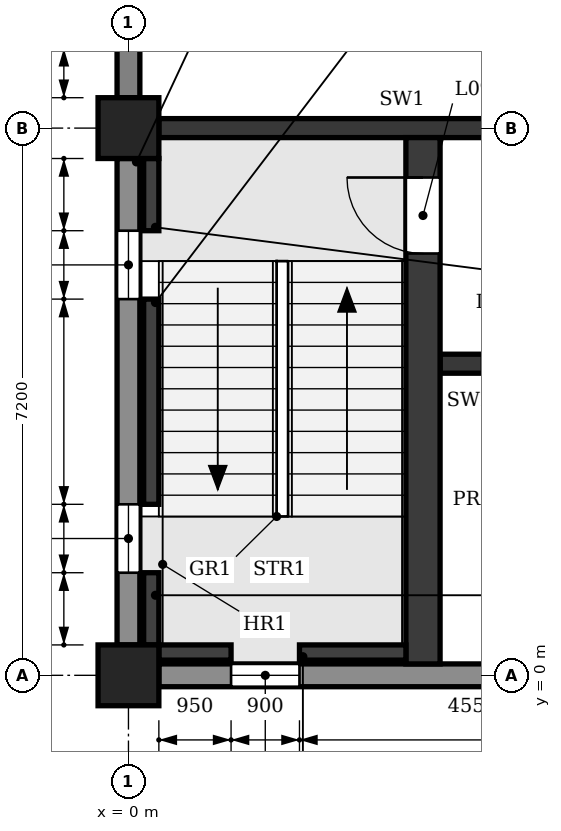
"""IFC4 building model, lengths in metres.
Left out: names, types, materials, properties, quantities, classifications, styles, units other than length and angle.
Written with IfcOpenShell. Run it as: python <this file> out.ifc"""

import sys

from ifc_helpers import new_model, si_unit, direction, frame, frame_2d, origin, origin_2d, place, context, subcontext, project, spatial, polyline, rectangle, outline, extrude, element, fill, save


model = new_model("IFC4")
c1 = context("Model", 3, precision=1e-05, world=origin(), true_north=direction((0.0, 1.0)))
c2 = subcontext(c1, "Body", "Model", "MODEL_VIEW")
j1 = project(units=[si_unit("LENGTHUNIT", "METRE"), si_unit("PLANEANGLEUNIT", "RADIAN")], contexts=[c1])
p1 = place(None, origin())
s1 = spatial("IfcSite", under=j1, at=p1, CompositionType="ELEMENT")
p2 = place(p1, origin())
s2 = spatial("IfcBuilding", under=s1, at=p2, CompositionType="ELEMENT")
p3 = place(p2, frame((0.0, 0.0, 45.3)))
s3 = spatial("IfcBuildingStorey", under=s2, at=p3, CompositionType="ELEMENT", Elevation=45.3)
for number, where, z_axis, x_axis in (
    (1, (0.0, 0.0, 0.0), (0.0, 0.0, 1.0), (1.0, 0.0, 0.0)),
    (2, (0.0, 7.2, 0.0), (0.0, 0.0, 1.0), (1.0, 0.0, 0.0)),
):
    element("IfcColumn", number, at=place(p3, frame(where, z_axis=z_axis, x_axis=x_axis)), inside=s3, PredefinedType="COLUMN", context=c2, shape_type="SweptSolid", body=[
        extrude(rectangle(XDim=0.8, YDim=0.8, at=origin_2d()), origin(), (0.0, 0.0, 1.0), 4.5),
    ])
p4 = place(p3, frame((0.0, 0.4, 0.0), z_axis=(0.0, 0.0, 1.0), x_axis=(0.0, 1.0, 0.0)))
e3 = element("IfcWall", 3, at=p4, inside=s3, PredefinedType="STANDARD", context=c2, shape_type="SweptSolid", body=[
    extrude(rectangle(XDim=6.4, YDim=0.3, at=frame_2d((3.2, 0.0))), origin(), (0.0, 0.0, 1.0), 3.65),
])
p5 = place(p4, frame((0.95, 0.0, 0.9)))
e4 = element("IfcOpeningElement", 4, at=p5, cuts=e3, PredefinedType="OPENING", context=c2, shape_type="SweptSolid", body=[
    extrude(outline(polyline([(0.0, 0.0), (0.9, 0.0), (0.9, 2.25), (0.45, 2.7), (0.0, 2.25), (0.0, 0.0)])), frame((0.0, 0.16, 0.0), z_axis=(0.0, -1.0, 0.0), x_axis=(1.0, 0.0, 0.0)), (0.0, 0.0, 1.0), 0.32),
])
p6 = place(p4, frame((4.55, 0.0, 0.9)))
e5 = element("IfcOpeningElement", 5, at=p6, cuts=e3, PredefinedType="OPENING", context=c2, shape_type="SweptSolid", body=[
    extrude(outline(polyline([(0.0, 0.0), (0.9, 0.0), (0.9, 2.25), (0.45, 2.7), (0.0, 2.25), (0.0, 0.0)])), frame((0.0, 0.16, 0.0), z_axis=(0.0, -1.0, 0.0), x_axis=(1.0, 0.0, 0.0)), (0.0, 0.0, 1.0), 0.32),
])
p7 = place(p3, frame((0.0, 7.6, 0.0), z_axis=(0.0, 0.0, 1.0), x_axis=(0.0, 1.0, 0.0)))
e6 = element("IfcWall", 6, at=p7, inside=s3, PredefinedType="STANDARD", context=c2, shape_type="SweptSolid", body=[
    extrude(rectangle(XDim=6.4, YDim=0.3, at=frame_2d((3.2, 0.0))), origin(), (0.0, 0.0, 1.0), 3.65),
])
p8 = place(p7, frame((0.65, 0.0, 0.9)))
e7 = element("IfcOpeningElement", 7, at=p8, cuts=e6, PredefinedType="OPENING", context=c2, shape_type="SweptSolid", body=[
    extrude(outline(polyline([(0.0, 0.0), (1.5, 0.0), (1.5, 1.95), (0.75, 2.7), (0.0, 1.95), (0.0, 0.0)])), frame((0.0, 0.16, 0.0), z_axis=(0.0, -1.0, 0.0), x_axis=(1.0, 0.0, 0.0)), (0.0, 0.0, 1.0), 0.32),
])
p9 = place(p7, frame((4.25, 0.0, 0.9)))
e8 = element("IfcOpeningElement", 8, at=p9, cuts=e6, PredefinedType="OPENING", context=c2, shape_type="SweptSolid", body=[
    extrude(outline(polyline([(0.0, 0.0), (1.5, 0.0), (1.5, 1.95), (0.75, 2.7), (0.0, 1.95), (0.0, 0.0)])), frame((0.0, 0.16, 0.0), z_axis=(0.0, -1.0, 0.0), x_axis=(1.0, 0.0, 0.0)), (0.0, 0.0, 1.0), 0.32),
])
p10 = place(p3, frame((0.4, 0.0, 0.0), z_axis=(0.0, 0.0, 1.0), x_axis=(1.0, 0.0, 0.0)))
e9 = element("IfcWall", 9, at=p10, inside=s3, PredefinedType="STANDARD", context=c2, shape_type="SweptSolid", body=[
    extrude(rectangle(XDim=6.4, YDim=0.3, at=frame_2d((3.2, 0.0))), origin(), (0.0, 0.0, 1.0), 3.65),
])
p11 = place(p10, frame((0.95, 0.0, 0.9)))
e10 = element("IfcOpeningElement", 10, at=p11, cuts=e9, PredefinedType="OPENING", context=c2, shape_type="SweptSolid", body=[
    extrude(outline(polyline([(0.0, 0.0), (0.9, 0.0), (0.9, 2.25), (0.45, 2.7), (0.0, 2.25), (0.0, 0.0)])), frame((0.0, 0.16, 0.0), z_axis=(0.0, -1.0, 0.0), x_axis=(1.0, 0.0, 0.0)), (0.0, 0.0, 1.0), 0.32),
])
p12 = place(p3, frame((0.4, 7.2, 0.0), z_axis=(0.0, 0.0, 1.0), x_axis=(1.0, 0.0, 0.0)))
e11 = element("IfcWall", 11, at=p12, inside=s3, PredefinedType="SHEAR", context=c2, shape_type="SweptSolid", body=[
    extrude(rectangle(XDim=6.4, YDim=0.25, at=frame_2d((3.2, 0.0))), origin(), (0.0, 0.0, 1.0), 3.55),
])
p13 = place(p12, frame((4.85, 0.0, 0.0)))
e12 = element("IfcOpeningElement", 12, at=p13, cuts=e11, PredefinedType="OPENING", context=c2, shape_type="SweptSolid", body=[
    extrude(rectangle(XDim=1.1, YDim=2.1, at=frame_2d((0.55, 1.05))), frame((0.0, 0.135, 0.0), z_axis=(0.0, -1.0, 0.0), x_axis=(1.0, 0.0, 0.0)), (0.0, 0.0, 1.0), 0.27),
])
p14 = place(p3, frame((0.3, 0.4, -0.25), z_axis=(0.0, 0.0, 1.0), x_axis=(0.0, 1.0, 0.0)))
e13 = element("IfcWall", 13, at=p14, inside=s3, PredefinedType="SHEAR", context=c2, shape_type="SweptSolid", body=[
    extrude(rectangle(XDim=0.95, YDim=0.2, at=frame_2d((0.475, 0.0))), origin(), (0.0, 0.0, 1.0), 4.5),
])
p15 = place(p3, frame((0.3, 2.25, -0.25), z_axis=(0.0, 0.0, 1.0), x_axis=(0.0, 1.0, 0.0)))
e14 = element("IfcWall", 14, at=p15, inside=s3, PredefinedType="SHEAR", context=c2, shape_type="SweptSolid", body=[
    extrude(rectangle(XDim=2.7, YDim=0.2, at=frame_2d((1.35, 0.0))), origin(), (0.0, 0.0, 1.0), 4.5),
])
p16 = place(p3, frame((0.3, 5.85, -0.25), z_axis=(0.0, 0.0, 1.0), x_axis=(0.0, 1.0, 0.0)))
e15 = element("IfcWall", 15, at=p16, inside=s3, PredefinedType="SHEAR", context=c2, shape_type="SweptSolid", body=[
    extrude(rectangle(XDim=0.95, YDim=0.2, at=frame_2d((0.475, 0.0))), origin(), (0.0, 0.0, 1.0), 4.5),
])
p17 = place(p3, frame((0.4, 0.3, -0.25), z_axis=(0.0, 0.0, 1.0), x_axis=(1.0, 0.0, 0.0)))
e16 = element("IfcWall", 16, at=p17, inside=s3, PredefinedType="SHEAR", context=c2, shape_type="SweptSolid", body=[
    extrude(rectangle(XDim=0.95, YDim=0.2, at=frame_2d((0.475, 0.0))), origin(), (0.0, 0.0, 1.0), 4.5),
])
p18 = place(p3, frame((2.25, 0.3, -0.25), z_axis=(0.0, 0.0, 1.0), x_axis=(1.0, 0.0, 0.0)))
e17 = element("IfcWall", 17, at=p18, inside=s3, PredefinedType="SHEAR", context=c2, shape_type="SweptSolid", body=[
    extrude(rectangle(XDim=1.4, YDim=0.2, at=frame_2d((0.7, 0.0))), origin(), (0.0, 0.0, 1.0), 4.5),
])
p19 = place(p3, frame((3.875, 0.15, 0.0), z_axis=(0.0, 0.0, 1.0), x_axis=(0.0, 1.0, 0.0)))
e18 = element("IfcWall", 18, at=p19, inside=s3, PredefinedType="SHEAR", context=c2, shape_type="SweptSolid", body=[
    extrude(rectangle(XDim=6.925, YDim=0.45, at=frame_2d((3.462, 0.0))), origin(), (0.0, 0.0, 1.0), 4.25),
])
p20 = place(p19, frame((5.4, 0.0, 0.0)))
e19 = element("IfcOpeningElement", 19, at=p20, cuts=e18, PredefinedType="OPENING", context=c2, shape_type="SweptSolid", body=[
    extrude(rectangle(XDim=1.0, YDim=2.1, at=frame_2d((0.5, 1.05))), frame((0.0, 0.235, 0.0), z_axis=(0.0, -1.0, 0.0), x_axis=(1.0, 0.0, 0.0)), (0.0, 0.0, 1.0), 0.47),
])
p21 = place(p3, frame((4.1, 4.1, 0.0), z_axis=(0.0, 0.0, 1.0), x_axis=(1.0, 0.0, 0.0)))
e20 = element("IfcWall", 20, at=p21, inside=s3, PredefinedType="SHEAR", context=c2, shape_type="SweptSolid", body=[
    extrude(rectangle(XDim=2.975, YDim=0.25, at=frame_2d((1.487, 0.0))), origin(), (0.0, 0.0, 1.0), 4.25),
])
p22 = place(p21, frame((0.55, 0.0, 0.0)))
e21 = element("IfcOpeningElement", 21, at=p22, cuts=e20, PredefinedType="OPENING", context=c2, shape_type="SweptSolid", body=[
    extrude(rectangle(XDim=0.9, YDim=2.1, at=frame_2d((0.45, 1.05))), frame((0.0, 0.135, 0.0), z_axis=(0.0, -1.0, 0.0), x_axis=(1.0, 0.0, 0.0)), (0.0, 0.0, 1.0), 0.27),
])
p23 = place(p11, origin())
e22 = element("IfcWindow", 22, at=p23, inside=s3, PartitioningType="SINGLE_PANEL", PredefinedType="WINDOW", context=c2, shape_type="SweptSolid", body=[
    extrude(outline(polyline([(0.0, 0.0), (0.9, 0.0), (0.9, 2.25), (0.45, 2.7), (0.0, 2.25), (0.0, 0.0)])), frame((0.0, 0.03, 0.0), z_axis=(0.0, -1.0, 0.0), x_axis=(1.0, 0.0, 0.0)), (0.0, 0.0, 1.0), 0.06),
])
fill(e10, e22)
p24 = place(p5, origin())
e23 = element("IfcWindow", 23, at=p24, inside=s3, PartitioningType="SINGLE_PANEL", PredefinedType="WINDOW", context=c2, shape_type="SweptSolid", body=[
    extrude(outline(polyline([(0.0, 0.0), (0.9, 0.0), (0.9, 2.25), (0.45, 2.7), (0.0, 2.25), (0.0, 0.0)])), frame((0.0, 0.03, 0.0), z_axis=(0.0, -1.0, 0.0), x_axis=(1.0, 0.0, 0.0)), (0.0, 0.0, 1.0), 0.06),
])
fill(e4, e23)
p25 = place(p6, origin())
e24 = element("IfcWindow", 24, at=p25, inside=s3, PartitioningType="SINGLE_PANEL", PredefinedType="WINDOW", context=c2, shape_type="SweptSolid", body=[
    extrude(outline(polyline([(0.0, 0.0), (0.9, 0.0), (0.9, 2.25), (0.45, 2.7), (0.0, 2.25), (0.0, 0.0)])), frame((0.0, 0.03, 0.0), z_axis=(0.0, -1.0, 0.0), x_axis=(1.0, 0.0, 0.0)), (0.0, 0.0, 1.0), 0.06),
])
fill(e5, e24)
p26 = place(p20, origin())
e25 = element("IfcDoor", 25, at=p26, inside=s3, OperationType="SINGLE_SWING_RIGHT", PredefinedType="DOOR", context=c2, shape_type="SweptSolid", body=[
    extrude(rectangle(XDim=1.0, YDim=2.1, at=frame_2d((0.5, 1.05))), frame((0.0, 0.025, 0.0), z_axis=(0.0, -1.0, 0.0), x_axis=(1.0, 0.0, 0.0)), (0.0, 0.0, 1.0), 0.05),
])
fill(e19, e25)
save(model, sys.argv[1])
